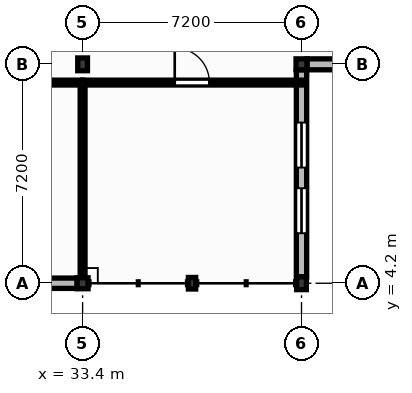
"""IFC4 building model, lengths in metres.
Left out: names, types, materials, properties, quantities, classifications, styles, units other than length and angle.
Written with IfcOpenShell. Run it as: python <this file> out.ifc"""

import sys

from ifc_helpers import new_model, si_unit, direction, frame, frame_2d, origin, origin_2d, place, context, subcontext, project, spatial, rectangle, extrude, element, fill, save


model = new_model("IFC4")
c1 = context("Model", 3, precision=1e-05, world=origin(), true_north=direction((0.0, 1.0)))
c2 = subcontext(c1, "Body", "Model", "MODEL_VIEW")
j1 = project(units=[si_unit("LENGTHUNIT", "METRE"), si_unit("PLANEANGLEUNIT", "RADIAN")], contexts=[c1])
p1 = place(None, origin())
s1 = spatial("IfcSite", under=j1, at=p1, CompositionType="ELEMENT")
p2 = place(p1, origin())
s2 = spatial("IfcBuilding", under=s1, at=p2, CompositionType="ELEMENT")
p3 = place(p2, frame((0.0, 0.0, 4.5)))
s3 = spatial("IfcBuildingStorey", under=s2, at=p3, CompositionType="ELEMENT", Elevation=4.5)
p4 = place(p3, frame((33.4, 4.2, 0.0), z_axis=(0.0, 0.0, 1.0), x_axis=(1.0, 0.0, 0.0)))
e1 = element("IfcColumn", 1, at=p4, inside=s3, PredefinedType="COLUMN", context=c2, shape_type="SweptSolid", body=[
    extrude(rectangle(XDim=0.36, YDim=0.36, at=origin_2d()), origin(), (0.0, 0.0, 1.0), 4.26),
])
for number, where, z_axis, x_axis in (
    (2, (33.4, 11.4, 0.0), (0.0, 0.0, 1.0), (1.0, 0.0, 0.0)),
    (3, (40.6, 4.2, 0.0), (0.0, 0.0, 1.0), (1.0, 0.0, 0.0)),
):
    element("IfcColumn", number, at=place(p3, frame(where, z_axis=z_axis, x_axis=x_axis)), inside=s3, PredefinedType="COLUMN", context=c2, shape_type="SweptSolid", body=[
        extrude(rectangle(XDim=0.32, YDim=0.42, at=origin_2d()), origin(), (0.0, 0.0, 1.0), 4.26),
    ])
p5 = place(p3, frame((40.6, 11.4, 0.0), z_axis=(0.0, 0.0, 1.0), x_axis=(1.0, 0.0, 0.0)))
e4 = element("IfcColumn", 4, at=p5, inside=s3, PredefinedType="COLUMN", context=c2, shape_type="SweptSolid", body=[
    extrude(rectangle(XDim=0.36, YDim=0.36, at=origin_2d()), origin(), (0.0, 0.0, 1.0), 4.26),
])
p6 = place(p3, frame((37.0, 4.2, 0.0), z_axis=(0.0, 0.0, 1.0), x_axis=(1.0, 0.0, 0.0)))
e5 = element("IfcColumn", 5, at=p6, inside=s3, PredefinedType="PILASTER", context=c2, shape_type="SweptSolid", body=[
    extrude(rectangle(XDim=0.24, YDim=0.38, at=origin_2d()), origin(), (0.0, 0.0, 1.0), 4.26),
])
p7 = place(p3, frame((26.36, 4.2, 0.0), z_axis=(0.0, 0.0, 1.0), x_axis=(1.0, 0.0, 0.0)))
e6 = element("IfcWall", 6, at=p7, inside=s3, PredefinedType="SOLIDWALL", context=c2, shape_type="SweptSolid", body=[
    extrude(rectangle(XDim=6.86, YDim=0.34, at=frame_2d((3.43, 0.0))), origin(), (0.0, 0.0, 1.0), 3.8),
])
p8 = place(p7, frame((0.905, 0.0, 1.05)))
e7 = element("IfcOpeningElement", 7, at=p8, cuts=e6, PredefinedType="OPENING", context=c2, shape_type="SweptSolid", body=[
    extrude(rectangle(XDim=1.26, YDim=1.65, at=frame_2d((0.63, 0.825))), frame((0.0, 0.18, 0.0), z_axis=(0.0, -1.0, 0.0), x_axis=(1.0, 0.0, 0.0)), (0.0, 0.0, 1.0), 0.36),
])
p9 = place(p7, frame((4.305, 0.0, 1.0)))
e8 = element("IfcOpeningElement", 8, at=p9, cuts=e6, PredefinedType="OPENING", context=c2, shape_type="SweptSolid", body=[
    extrude(rectangle(XDim=1.08, YDim=1.95, at=frame_2d((0.54, 0.975))), frame((0.0, 0.18, 0.0), z_axis=(0.0, -1.0, 0.0), x_axis=(1.0, 0.0, 0.0)), (0.0, 0.0, 1.0), 0.36),
])
p10 = place(p3, frame((40.6, 4.41, 0.0), z_axis=(0.0, 0.0, 1.0), x_axis=(0.0, 1.0, 0.0)))
e9 = element("IfcWall", 9, at=p10, inside=s3, PredefinedType="SOLIDWALL", context=c2, shape_type="SweptSolid", body=[
    extrude(rectangle(XDim=6.81, YDim=0.34, at=frame_2d((3.405, 0.0))), origin(), (0.0, 0.0, 1.0), 3.8),
])
p11 = place(p10, frame((1.435, 0.0, 1.0)))
e10 = element("IfcOpeningElement", 10, at=p11, cuts=e9, PredefinedType="OPENING", context=c2, shape_type="SweptSolid", body=[
    extrude(rectangle(XDim=1.48, YDim=1.95, at=frame_2d((0.74, 0.975))), frame((0.0, 0.18, 0.0), z_axis=(0.0, -1.0, 0.0), x_axis=(1.0, 0.0, 0.0)), (0.0, 0.0, 1.0), 0.36),
])
p12 = place(p10, frame((3.595, 0.0, 1.0)))
e11 = element("IfcOpeningElement", 11, at=p12, cuts=e9, PredefinedType="OPENING", context=c2, shape_type="SweptSolid", body=[
    extrude(rectangle(XDim=1.48, YDim=1.95, at=frame_2d((0.74, 0.975))), frame((0.0, 0.18, 0.0), z_axis=(0.0, -1.0, 0.0), x_axis=(1.0, 0.0, 0.0)), (0.0, 0.0, 1.0), 0.36),
])
p13 = place(p3, frame((40.78, 11.4, 0.0), z_axis=(0.0, 0.0, 1.0), x_axis=(1.0, 0.0, 0.0)))
e12 = element("IfcWall", 12, at=p13, inside=s3, PredefinedType="SOLIDWALL", context=c2, shape_type="SweptSolid", body=[
    extrude(rectangle(XDim=6.86, YDim=0.36, at=frame_2d((3.43, 0.0))), origin(), (0.0, 0.0, 1.0), 3.8),
])
p14 = place(p13, frame((1.33, 0.0, 1.0)))
e13 = element("IfcOpeningElement", 13, at=p14, cuts=e12, PredefinedType="OPENING", context=c2, shape_type="SweptSolid", body=[
    extrude(rectangle(XDim=1.76, YDim=1.95, at=frame_2d((0.88, 0.975))), frame((0.0, 0.19, 0.0), z_axis=(0.0, -1.0, 0.0), x_axis=(1.0, 0.0, 0.0)), (0.0, 0.0, 1.0), 0.38),
])
p15 = place(p13, frame((3.77, 0.0, 1.0)))
e14 = element("IfcOpeningElement", 14, at=p15, cuts=e12, PredefinedType="OPENING", context=c2, shape_type="SweptSolid", body=[
    extrude(rectangle(XDim=1.76, YDim=1.95, at=frame_2d((0.88, 0.975))), frame((0.0, 0.19, 0.0), z_axis=(0.0, -1.0, 0.0), x_axis=(1.0, 0.0, 0.0)), (0.0, 0.0, 1.0), 0.38),
])
p16 = place(p3, frame((29.31, 10.8, 0.0), z_axis=(0.0, 0.0, 1.0), x_axis=(1.0, 0.0, 0.0)))
e15 = element("IfcWall", 15, at=p16, inside=s3, PredefinedType="PARTITIONING", context=c2, shape_type="SweptSolid", body=[
    extrude(rectangle(XDim=4.09, YDim=0.16, at=frame_2d((2.045, 0.0))), origin(), (0.0, 0.0, 1.0), 4.18),
])
p17 = place(p16, frame((1.475, 0.0, 0.0)))
e16 = element("IfcOpeningElement", 16, at=p17, cuts=e15, PredefinedType="OPENING", context=c2, shape_type="SweptSolid", body=[
    extrude(rectangle(XDim=1.14, YDim=2.15, at=frame_2d((0.57, 1.075))), frame((0.0, 0.09, 0.0), z_axis=(0.0, -1.0, 0.0), x_axis=(1.0, 0.0, 0.0)), (0.0, 0.0, 1.0), 0.18),
])
p18 = place(p3, frame((33.4, 4.38, 0.0), z_axis=(0.0, 0.0, 1.0), x_axis=(0.0, 1.0, 0.0)))
e17 = element("IfcWall", 17, at=p18, inside=s3, PredefinedType="PARTITIONING", context=c2, shape_type="SweptSolid", body=[
    extrude(rectangle(XDim=6.35, YDim=0.16, at=frame_2d((3.175, 0.0))), origin(), (0.0, 0.0, 1.0), 3.74),
])
p19 = place(p3, frame((33.4, 10.8, 0.0), z_axis=(0.0, 0.0, 1.0), x_axis=(1.0, 0.0, 0.0)))
e18 = element("IfcWall", 18, at=p19, inside=s3, PredefinedType="PARTITIONING", context=c2, shape_type="SweptSolid", body=[
    extrude(rectangle(XDim=7.2, YDim=0.16, at=frame_2d((3.6, 0.0))), origin(), (0.0, 0.0, 1.0), 4.18),
])
p20 = place(p19, frame((3.03, 0.0, 0.0)))
e19 = element("IfcOpeningElement", 19, at=p20, cuts=e18, PredefinedType="OPENING", context=c2, shape_type="SweptSolid", body=[
    extrude(rectangle(XDim=1.14, YDim=2.15, at=frame_2d((0.57, 1.075))), frame((0.0, 0.09, 0.0), z_axis=(0.0, -1.0, 0.0), x_axis=(1.0, 0.0, 0.0)), (0.0, 0.0, 1.0), 0.18),
])
p21 = place(p11, origin())
e20 = element("IfcWindow", 20, at=p21, inside=s3, PartitioningType="SINGLE_PANEL", PredefinedType="WINDOW", context=c2, shape_type="SweptSolid", body=[
    extrude(rectangle(XDim=1.48, YDim=1.95, at=frame_2d((0.74, 0.975))), frame((0.0, 0.03, 0.0), z_axis=(0.0, -1.0, 0.0), x_axis=(1.0, 0.0, 0.0)), (0.0, 0.0, 1.0), 0.06),
])
fill(e10, e20)
p22 = place(p12, origin())
e21 = element("IfcWindow", 21, at=p22, inside=s3, PartitioningType="SINGLE_PANEL", PredefinedType="WINDOW", context=c2, shape_type="SweptSolid", body=[
    extrude(rectangle(XDim=1.48, YDim=1.95, at=frame_2d((0.74, 0.975))), frame((0.0, 0.03, 0.0), z_axis=(0.0, -1.0, 0.0), x_axis=(1.0, 0.0, 0.0)), (0.0, 0.0, 1.0), 0.06),
])
fill(e11, e21)
p23 = place(p20, origin())
e22 = element("IfcDoor", 22, at=p23, inside=s3, OperationType="SINGLE_SWING_LEFT", PredefinedType="DOOR", context=c2, shape_type="SweptSolid", body=[
    extrude(rectangle(XDim=1.14, YDim=2.15, at=frame_2d((0.57, 1.075))), frame((0.0, 0.025, 0.0), z_axis=(0.0, -1.0, 0.0), x_axis=(1.0, 0.0, 0.0)), (0.0, 0.0, 1.0), 0.05),
])
fill(e19, e22)
save(model, sys.argv[1])
